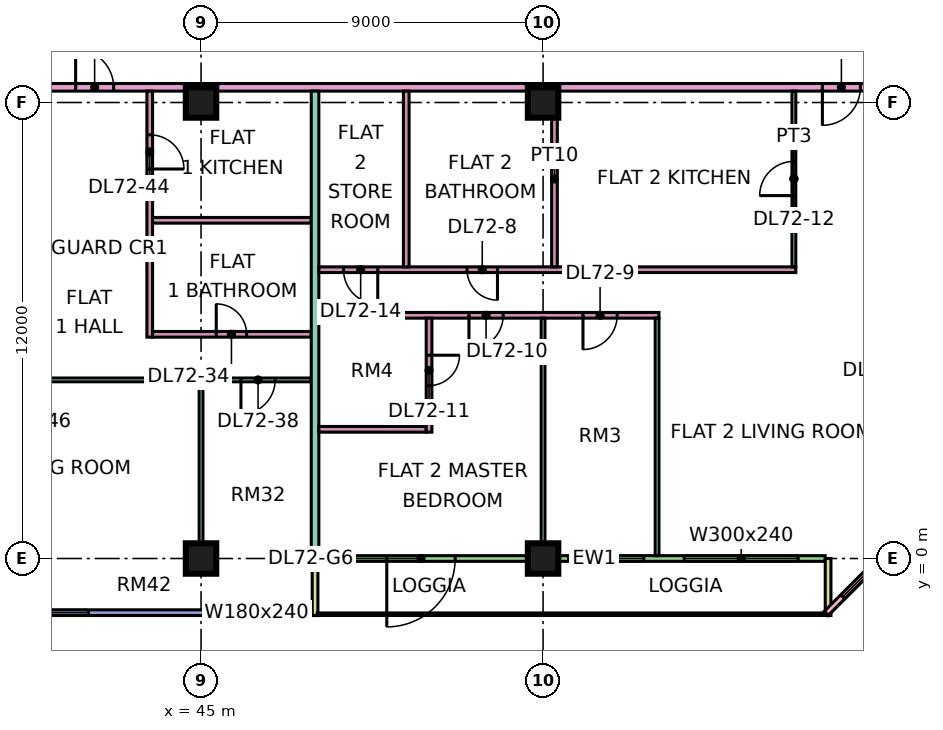
"""IFC4 building model, lengths in metres.
Left out: names, types, materials, properties, quantities, classifications, styles, units other than length and angle.
Written with IfcOpenShell. Run it as: python <this file> out.ifc"""

import sys

from ifc_helpers import new_model, si_unit, direction, frame, frame_2d, origin, origin_2d, place, context, subcontext, project, spatial, rectangle, extrude, element, fill, save


model = new_model("IFC4")
c1 = context("Model", 3, precision=1e-05, world=origin(), true_north=direction((0.0, 1.0)))
c2 = subcontext(c1, "Body", "Model", "MODEL_VIEW")
j1 = project(units=[si_unit("LENGTHUNIT", "METRE"), si_unit("PLANEANGLEUNIT", "RADIAN")], contexts=[c1])
p1 = place(None, origin())
s1 = spatial("IfcSite", under=j1, at=p1, CompositionType="ELEMENT")
p2 = place(p1, origin())
s2 = spatial("IfcBuilding", under=s1, at=p2, CompositionType="ELEMENT")
p3 = place(p2, frame((0.0, 0.0, 307.15)))
s3 = spatial("IfcBuildingStorey", under=s2, at=p3, CompositionType="ELEMENT", Elevation=307.15)
for number, where, z_axis, x_axis in (
    (1, (45.0, 0.0, 0.0), (0.0, 0.0, 1.0), (1.0, 0.0, 0.0)),
    (2, (45.0, 12.0, 0.0), (0.0, 0.0, 1.0), (1.0, 0.0, 0.0)),
    (3, (54.0, 0.0, 0.0), (0.0, 0.0, 1.0), (1.0, 0.0, 0.0)),
    (4, (54.0, 12.0, 0.0), (0.0, 0.0, 1.0), (1.0, 0.0, 0.0)),
):
    element("IfcColumn", number, at=place(p3, frame(where, z_axis=z_axis, x_axis=x_axis)), inside=s3, PredefinedType="COLUMN", context=c2, shape_type="SweptSolid", body=[
        extrude(rectangle(XDim=0.8, YDim=0.8, at=origin_2d()), origin(), (0.0, 0.0, 1.0), 3.75),
    ])
p4 = place(p3, frame((36.075, -1.425, 0.0), z_axis=(0.0, 0.0, 1.0), x_axis=(1.0, 0.0, 0.0)))
e5 = element("IfcWall", 5, at=p4, inside=s3, PredefinedType="SOLIDWALL", context=c2, shape_type="SweptSolid", body=[
    extrude(rectangle(XDim=11.85, YDim=0.15, at=frame_2d((5.925, 0.0))), origin(), (0.0, 0.0, 1.0), 3.35),
])
p5 = place(p4, frame((2.962, 0.0, 0.45)))
e6 = element("IfcOpeningElement", 6, at=p5, cuts=e5, PredefinedType="OPENING", context=c2, shape_type="SweptSolid", body=[
    extrude(rectangle(XDim=3.0, YDim=2.4, at=frame_2d((1.5, 1.2))), frame((0.0, 0.085, 0.0), z_axis=(0.0, -1.0, 0.0), x_axis=(1.0, 0.0, 0.0)), (0.0, 0.0, 1.0), 0.17),
])
p6 = place(p4, frame((9.488, 0.0, 0.45)))
e7 = element("IfcOpeningElement", 7, at=p6, cuts=e5, PredefinedType="OPENING", context=c2, shape_type="SweptSolid", body=[
    extrude(rectangle(XDim=1.8, YDim=2.4, at=frame_2d((0.9, 1.2))), frame((0.0, 0.085, 0.0), z_axis=(0.0, -1.0, 0.0), x_axis=(1.0, 0.0, 0.0)), (0.0, 0.0, 1.0), 0.17),
])
p7 = place(p3, frame((48.075, 0.0, 0.0), z_axis=(0.0, 0.0, 1.0), x_axis=(1.0, 0.0, 0.0)))
e8 = element("IfcWall", 8, at=p7, inside=s3, PredefinedType="SOLIDWALL", context=c2, shape_type="SweptSolid", body=[
    extrude(rectangle(XDim=13.35, YDim=0.15, at=frame_2d((6.675, 0.0))), origin(), (0.0, 0.0, 1.0), 3.35),
])
p8 = place(p7, frame((1.812, 0.0, 0.0)))
e9 = element("IfcOpeningElement", 9, at=p8, cuts=e8, PredefinedType="OPENING", context=c2, shape_type="SweptSolid", body=[
    extrude(rectangle(XDim=1.8, YDim=2.4, at=frame_2d((0.9, 1.2))), frame((0.0, 0.085, 0.0), z_axis=(0.0, -1.0, 0.0), x_axis=(1.0, 0.0, 0.0)), (0.0, 0.0, 1.0), 0.17),
])
p9 = place(p7, frame((6.775, 0.0, 0.45)))
e10 = element("IfcOpeningElement", 10, at=p9, cuts=e8, PredefinedType="OPENING", context=c2, shape_type="SweptSolid", body=[
    extrude(rectangle(XDim=1.8, YDim=2.4, at=frame_2d((0.9, 1.2))), frame((0.0, 0.085, 0.0), z_axis=(0.0, -1.0, 0.0), x_axis=(1.0, 0.0, 0.0)), (0.0, 0.0, 1.0), 0.17),
])
p10 = place(p7, frame((9.637, 0.0, 0.45)))
e11 = element("IfcOpeningElement", 11, at=p10, cuts=e8, PredefinedType="OPENING", context=c2, shape_type="SweptSolid", body=[
    extrude(rectangle(XDim=3.0, YDim=2.4, at=frame_2d((1.5, 1.2))), frame((0.0, 0.085, 0.0), z_axis=(0.0, -1.0, 0.0), x_axis=(1.0, 0.0, 0.0)), (0.0, 0.0, 1.0), 0.17),
])
for number, where, z_axis, x_axis in (
    (12, (48.0, -1.5, 0.0), (0.0, 0.0, 1.0), (0.0, 1.0, 0.0)),
    (13, (61.5, -1.5, 0.0), (0.0, 0.0, 1.0), (0.0, 1.0, 0.0)),
):
    element("IfcWall", number, at=place(p3, frame(where, z_axis=z_axis, x_axis=x_axis)), inside=s3, PredefinedType="SOLIDWALL", context=c2, shape_type="SweptSolid", body=[
        extrude(rectangle(XDim=1.5, YDim=0.15, at=frame_2d((0.75, 0.0))), origin(), (0.0, 0.0, 1.0), 3.35),
    ])
p11 = place(p3, frame((61.447, -1.447, 0.0), z_axis=(0.0, 0.0, 1.0), x_axis=(0.707106781187, 0.707106781187, 0.0)))
e14 = element("IfcWall", 14, at=p11, inside=s3, PredefinedType="SOLIDWALL", context=c2, shape_type="SweptSolid", body=[
    extrude(rectangle(XDim=4.243, YDim=0.15, at=frame_2d((2.121, 0.0))), origin(), (0.0, 0.0, 1.0), 3.35),
])
p12 = place(p11, frame((0.621, 0.0, 0.45)))
e15 = element("IfcOpeningElement", 15, at=p12, cuts=e14, PredefinedType="OPENING", context=c2, shape_type="SweptSolid", body=[
    extrude(rectangle(XDim=3.0, YDim=2.4, at=frame_2d((1.5, 1.2))), frame((0.0, 0.085, 0.0), z_axis=(0.0, -1.0, 0.0), x_axis=(1.0, 0.0, 0.0)), (0.0, 0.0, 1.0), 0.17),
])
p13 = place(p3, frame((33.05, 4.7, 0.0), z_axis=(0.0, 0.0, 1.0), x_axis=(1.0, 0.0, 0.0)))
e16 = element("IfcWall", 16, at=p13, inside=s3, PredefinedType="PARTITIONING", context=c2, shape_type="SweptSolid", body=[
    extrude(rectangle(XDim=14.85, YDim=0.1, at=frame_2d((7.425, 0.0))), origin(), (0.0, 0.0, 1.0), 3.35),
])
p14 = place(p13, frame((1.0, 0.0, 0.0)))
e17 = element("IfcOpeningElement", 17, at=p14, cuts=e16, PredefinedType="OPENING", context=c2, shape_type="SweptSolid", body=[
    extrude(rectangle(XDim=0.9, YDim=2.1, at=frame_2d((0.45, 1.05))), frame((0.0, 0.06, 0.0), z_axis=(0.0, -1.0, 0.0), x_axis=(1.0, 0.0, 0.0)), (0.0, 0.0, 1.0), 0.12),
])
p15 = place(p13, frame((13.0, 0.0, 0.0)))
e18 = element("IfcOpeningElement", 18, at=p15, cuts=e16, PredefinedType="OPENING", context=c2, shape_type="SweptSolid", body=[
    extrude(rectangle(XDim=0.9, YDim=2.1, at=frame_2d((0.45, 1.05))), frame((0.0, 0.06, 0.0), z_axis=(0.0, -1.0, 0.0), x_axis=(1.0, 0.0, 0.0)), (0.0, 0.0, 1.0), 0.12),
])
p16 = place(p13, frame((7.0, 0.0, 0.0)))
e19 = element("IfcOpeningElement", 19, at=p16, cuts=e16, PredefinedType="OPENING", context=c2, shape_type="SweptSolid", body=[
    extrude(rectangle(XDim=0.9, YDim=2.1, at=frame_2d((0.45, 1.05))), frame((0.0, 0.06, 0.0), z_axis=(0.0, -1.0, 0.0), x_axis=(1.0, 0.0, 0.0)), (0.0, 0.0, 1.0), 0.12),
])
p17 = place(p3, frame((40.65, 12.4, 0.0), z_axis=(0.0, 0.0, 1.0), x_axis=(1.0, 0.0, 0.0)))
e20 = element("IfcWall", 20, at=p17, inside=s3, PredefinedType="PARTITIONING", context=c2, shape_type="SweptSolid", body=[
    extrude(rectangle(XDim=22.35, YDim=0.2, at=frame_2d((11.175, 0.0))), origin(), (0.0, 0.0, 1.0), 3.35),
])
p18 = place(p17, frame((20.7, 0.0, 0.0)))
e21 = element("IfcOpeningElement", 21, at=p18, cuts=e20, PredefinedType="OPENING", context=c2, shape_type="SweptSolid", body=[
    extrude(rectangle(XDim=1.0, YDim=2.1, at=frame_2d((0.5, 1.05))), frame((0.0, 0.11, 0.0), z_axis=(0.0, -1.0, 0.0), x_axis=(1.0, 0.0, 0.0)), (0.0, 0.0, 1.0), 0.22),
])
p19 = place(p17, frame((1.05, 0.0, 0.0)))
e22 = element("IfcOpeningElement", 22, at=p19, cuts=e20, PredefinedType="OPENING", context=c2, shape_type="SweptSolid", body=[
    extrude(rectangle(XDim=1.0, YDim=2.1, at=frame_2d((0.5, 1.05))), frame((0.0, 0.11, 0.0), z_axis=(0.0, -1.0, 0.0), x_axis=(1.0, 0.0, 0.0)), (0.0, 0.0, 1.0), 0.22),
])
p20 = place(p3, frame((43.65, 5.825, 0.0), z_axis=(0.0, 0.0, 1.0), x_axis=(0.0, 1.0, 0.0)))
e23 = element("IfcWall", 23, at=p20, inside=s3, PredefinedType="PARTITIONING", context=c2, shape_type="SweptSolid", body=[
    extrude(rectangle(XDim=6.475, YDim=0.15, at=frame_2d((3.238, 0.0))), origin(), (0.0, 0.0, 1.0), 3.35),
])
p21 = place(p20, frame((4.425, 0.0, 0.0)))
e24 = element("IfcOpeningElement", 24, at=p21, cuts=e23, PredefinedType="OPENING", context=c2, shape_type="SweptSolid", body=[
    extrude(rectangle(XDim=0.9, YDim=2.1, at=frame_2d((0.45, 1.05))), frame((0.0, 0.085, 0.0), z_axis=(0.0, -1.0, 0.0), x_axis=(1.0, 0.0, 0.0)), (0.0, 0.0, 1.0), 0.17),
])
p22 = place(p3, frame((43.725, 5.9, 0.0), z_axis=(0.0, 0.0, 1.0), x_axis=(1.0, 0.0, 0.0)))
e25 = element("IfcWall", 25, at=p22, inside=s3, PredefinedType="PARTITIONING", context=c2, shape_type="SweptSolid", body=[
    extrude(rectangle(XDim=4.175, YDim=0.15, at=frame_2d((2.087, 0.0))), origin(), (0.0, 0.0, 1.0), 3.35),
])
p23 = place(p22, frame((1.675, 0.0, 0.0)))
e26 = element("IfcOpeningElement", 26, at=p23, cuts=e25, PredefinedType="OPENING", context=c2, shape_type="SweptSolid", body=[
    extrude(rectangle(XDim=0.8, YDim=2.1, at=frame_2d((0.4, 1.05))), frame((0.0, 0.085, 0.0), z_axis=(0.0, -1.0, 0.0), x_axis=(1.0, 0.0, 0.0)), (0.0, 0.0, 1.0), 0.17),
])
p24 = place(p3, frame((43.725, 8.9, 0.0), z_axis=(0.0, 0.0, 1.0), x_axis=(1.0, 0.0, 0.0)))
e27 = element("IfcWall", 27, at=p24, inside=s3, PredefinedType="PARTITIONING", context=c2, shape_type="SweptSolid", body=[
    extrude(rectangle(XDim=4.175, YDim=0.15, at=frame_2d((2.087, 0.0))), origin(), (0.0, 0.0, 1.0), 3.35),
])
p25 = place(p3, frame((45.0, 0.0, 0.0), z_axis=(0.0, 0.0, 1.0), x_axis=(0.0, 1.0, 0.0)))
e28 = element("IfcWall", 28, at=p25, inside=s3, PredefinedType="PARTITIONING", context=c2, shape_type="SweptSolid", body=[
    extrude(rectangle(XDim=4.65, YDim=0.1, at=frame_2d((2.325, 0.0))), origin(), (0.0, 0.0, 1.0), 3.35),
])
p26 = place(p3, frame((48.0, 0.0, 0.0), z_axis=(0.0, 0.0, 1.0), x_axis=(0.0, 1.0, 0.0)))
e29 = element("IfcWall", 29, at=p26, inside=s3, PredefinedType="PARTITIONING", context=c2, shape_type="SweptSolid", body=[
    extrude(rectangle(XDim=12.3, YDim=0.2, at=frame_2d((6.15, 0.0))), origin(), (0.0, 0.0, 1.0), 3.35),
])
p27 = place(p3, frame((48.1, 3.4, 0.0), z_axis=(0.0, 0.0, 1.0), x_axis=(1.0, 0.0, 0.0)))
e30 = element("IfcWall", 30, at=p27, inside=s3, PredefinedType="PARTITIONING", context=c2, shape_type="SweptSolid", body=[
    extrude(rectangle(XDim=2.825, YDim=0.15, at=frame_2d((1.413, 0.0))), origin(), (0.0, 0.0, 1.0), 3.35),
])
p28 = place(p3, frame((48.1, 6.4, 0.0), z_axis=(0.0, 0.0, 1.0), x_axis=(1.0, 0.0, 0.0)))
e31 = element("IfcWall", 31, at=p28, inside=s3, PredefinedType="PARTITIONING", context=c2, shape_type="SweptSolid", body=[
    extrude(rectangle(XDim=8.95, YDim=0.15, at=frame_2d((4.475, 0.0))), origin(), (0.0, 0.0, 1.0), 3.35),
])
p29 = place(p28, frame((6.95, 0.0, 0.0)))
e32 = element("IfcOpeningElement", 32, at=p29, cuts=e31, PredefinedType="OPENING", context=c2, shape_type="SweptSolid", body=[
    extrude(rectangle(XDim=0.9, YDim=2.1, at=frame_2d((0.45, 1.05))), frame((0.0, 0.085, 0.0), z_axis=(0.0, -1.0, 0.0), x_axis=(1.0, 0.0, 0.0)), (0.0, 0.0, 1.0), 0.17),
])
p30 = place(p28, frame((3.95, 0.0, 0.0)))
e33 = element("IfcOpeningElement", 33, at=p30, cuts=e31, PredefinedType="OPENING", context=c2, shape_type="SweptSolid", body=[
    extrude(rectangle(XDim=0.9, YDim=2.1, at=frame_2d((0.45, 1.05))), frame((0.0, 0.085, 0.0), z_axis=(0.0, -1.0, 0.0), x_axis=(1.0, 0.0, 0.0)), (0.0, 0.0, 1.0), 0.17),
])
p31 = place(p3, frame((48.1, 7.6, 0.0), z_axis=(0.0, 0.0, 1.0), x_axis=(1.0, 0.0, 0.0)))
e34 = element("IfcWall", 34, at=p31, inside=s3, PredefinedType="PARTITIONING", context=c2, shape_type="SweptSolid", body=[
    extrude(rectangle(XDim=12.55, YDim=0.15, at=frame_2d((6.275, 0.0))), origin(), (0.0, 0.0, 1.0), 3.35),
])
p32 = place(p31, frame((3.9, 0.0, 0.0)))
e35 = element("IfcOpeningElement", 35, at=p32, cuts=e34, PredefinedType="OPENING", context=c2, shape_type="SweptSolid", body=[
    extrude(rectangle(XDim=0.8, YDim=2.1, at=frame_2d((0.4, 1.05))), frame((0.0, 0.085, 0.0), z_axis=(0.0, -1.0, 0.0), x_axis=(1.0, 0.0, 0.0)), (0.0, 0.0, 1.0), 0.17),
])
p33 = place(p31, frame((0.65, 0.0, 0.0)))
e36 = element("IfcOpeningElement", 36, at=p33, cuts=e34, PredefinedType="OPENING", context=c2, shape_type="SweptSolid", body=[
    extrude(rectangle(XDim=0.9, YDim=2.1, at=frame_2d((0.45, 1.05))), frame((0.0, 0.085, 0.0), z_axis=(0.0, -1.0, 0.0), x_axis=(1.0, 0.0, 0.0)), (0.0, 0.0, 1.0), 0.17),
])
p34 = place(p3, frame((50.4, 7.675, 0.0), z_axis=(0.0, 0.0, 1.0), x_axis=(0.0, 1.0, 0.0)))
e37 = element("IfcWall", 37, at=p34, inside=s3, PredefinedType="PARTITIONING", context=c2, shape_type="SweptSolid", body=[
    extrude(rectangle(XDim=4.625, YDim=0.15, at=frame_2d((2.312, 0.0))), origin(), (0.0, 0.0, 1.0), 3.35),
])
p35 = place(p3, frame((51.0, 3.325, 0.0), z_axis=(0.0, 0.0, 1.0), x_axis=(0.0, 1.0, 0.0)))
e38 = element("IfcWall", 38, at=p35, inside=s3, PredefinedType="PARTITIONING", context=c2, shape_type="SweptSolid", body=[
    extrude(rectangle(XDim=3.0, YDim=0.15, at=frame_2d((1.5, 0.0))), origin(), (0.0, 0.0, 1.0), 3.35),
])
p36 = place(p35, frame((1.225, 0.0, 0.0)))
e39 = element("IfcOpeningElement", 39, at=p36, cuts=e38, PredefinedType="OPENING", context=c2, shape_type="SweptSolid", body=[
    extrude(rectangle(XDim=0.8, YDim=2.1, at=frame_2d((0.4, 1.05))), frame((0.0, 0.085, 0.0), z_axis=(0.0, -1.0, 0.0), x_axis=(1.0, 0.0, 0.0)), (0.0, 0.0, 1.0), 0.17),
])
p37 = place(p3, frame((54.0, 0.074, 0.0), z_axis=(0.0, 0.0, 1.0), x_axis=(0.0, 1.0, 0.0)))
e40 = element("IfcWall", 40, at=p37, inside=s3, PredefinedType="PARTITIONING", context=c2, shape_type="SweptSolid", body=[
    extrude(rectangle(XDim=6.251, YDim=0.1, at=frame_2d((3.125, 0.0))), origin(), (0.0, 0.0, 1.0), 3.35),
])
p38 = place(p3, frame((54.3, 7.675, 0.0), z_axis=(0.0, 0.0, 1.0), x_axis=(0.0, 1.0, 0.0)))
e41 = element("IfcWall", 41, at=p38, inside=s3, PredefinedType="PARTITIONING", context=c2, shape_type="SweptSolid", body=[
    extrude(rectangle(XDim=4.625, YDim=0.15, at=frame_2d((2.312, 0.0))), origin(), (0.0, 0.0, 1.0), 3.35),
])
p39 = place(p3, frame((57.0, 0.074, 0.0), z_axis=(0.0, 0.0, 1.0), x_axis=(0.0, 1.0, 0.0)))
e42 = element("IfcWall", 42, at=p39, inside=s3, PredefinedType="PARTITIONING", context=c2, shape_type="SweptSolid", body=[
    extrude(rectangle(XDim=6.251, YDim=0.1, at=frame_2d((3.125, 0.0))), origin(), (0.0, 0.0, 1.0), 3.35),
])
p40 = place(p3, frame((60.6, 7.675, 0.0), z_axis=(0.0, 0.0, 1.0), x_axis=(0.0, 1.0, 0.0)))
e43 = element("IfcWall", 43, at=p40, inside=s3, PredefinedType="PARTITIONING", context=c2, shape_type="SweptSolid", body=[
    extrude(rectangle(XDim=4.625, YDim=0.1, at=frame_2d((2.312, 0.0))), origin(), (0.0, 0.0, 1.0), 3.35),
])
p41 = place(p40, frame((1.875, 0.0, 0.0)))
e44 = element("IfcOpeningElement", 44, at=p41, cuts=e43, PredefinedType="OPENING", context=c2, shape_type="SweptSolid", body=[
    extrude(rectangle(XDim=0.9, YDim=2.1, at=frame_2d((0.45, 1.05))), frame((0.0, 0.06, 0.0), z_axis=(0.0, -1.0, 0.0), x_axis=(1.0, 0.0, 0.0)), (0.0, 0.0, 1.0), 0.12),
])
p42 = place(p5, origin())
e45 = element("IfcWindow", 45, at=p42, inside=s3, PartitioningType="SINGLE_PANEL", PredefinedType="WINDOW", context=c2, shape_type="SweptSolid", body=[
    extrude(rectangle(XDim=3.0, YDim=2.4, at=frame_2d((1.5, 1.2))), frame((0.0, 0.03, 0.0), z_axis=(0.0, -1.0, 0.0), x_axis=(1.0, 0.0, 0.0)), (0.0, 0.0, 1.0), 0.06),
])
fill(e6, e45)
p43 = place(p6, origin())
e46 = element("IfcWindow", 46, at=p43, inside=s3, PartitioningType="SINGLE_PANEL", PredefinedType="WINDOW", context=c2, shape_type="SweptSolid", body=[
    extrude(rectangle(XDim=1.8, YDim=2.4, at=frame_2d((0.9, 1.2))), frame((0.0, 0.03, 0.0), z_axis=(0.0, -1.0, 0.0), x_axis=(1.0, 0.0, 0.0)), (0.0, 0.0, 1.0), 0.06),
])
fill(e7, e46)
p44 = place(p8, frame((1.8, 0.0, 0.0), z_axis=(0.0, 0.0, 1.0), x_axis=(-1.0, 0.0, 0.0)))
e47 = element("IfcDoor", 47, at=p44, inside=s3, OperationType="DOUBLE_DOOR_SINGLE_SWING", PredefinedType="DOOR", context=c2, shape_type="SweptSolid", body=[
    extrude(rectangle(XDim=1.8, YDim=2.4, at=frame_2d((0.9, 1.2))), frame((0.0, 0.025, 0.0), z_axis=(0.0, -1.0, 0.0), x_axis=(1.0, 0.0, 0.0)), (0.0, 0.0, 1.0), 0.05),
])
fill(e9, e47)
p45 = place(p9, origin())
e48 = element("IfcWindow", 48, at=p45, inside=s3, PartitioningType="SINGLE_PANEL", PredefinedType="WINDOW", context=c2, shape_type="SweptSolid", body=[
    extrude(rectangle(XDim=1.8, YDim=2.4, at=frame_2d((0.9, 1.2))), frame((0.0, 0.03, 0.0), z_axis=(0.0, -1.0, 0.0), x_axis=(1.0, 0.0, 0.0)), (0.0, 0.0, 1.0), 0.06),
])
fill(e10, e48)
p46 = place(p10, origin())
e49 = element("IfcWindow", 49, at=p46, inside=s3, PartitioningType="SINGLE_PANEL", PredefinedType="WINDOW", context=c2, shape_type="SweptSolid", body=[
    extrude(rectangle(XDim=3.0, YDim=2.4, at=frame_2d((1.5, 1.2))), frame((0.0, 0.03, 0.0), z_axis=(0.0, -1.0, 0.0), x_axis=(1.0, 0.0, 0.0)), (0.0, 0.0, 1.0), 0.06),
])
fill(e11, e49)
p47 = place(p12, origin())
e50 = element("IfcWindow", 50, at=p47, inside=s3, PartitioningType="SINGLE_PANEL", PredefinedType="WINDOW", context=c2, shape_type="SweptSolid", body=[
    extrude(rectangle(XDim=3.0, YDim=2.4, at=frame_2d((1.5, 1.2))), frame((0.0, 0.03, 0.0), z_axis=(0.0, -1.0, 0.0), x_axis=(1.0, 0.0, 0.0)), (0.0, 0.0, 1.0), 0.06),
])
fill(e15, e50)
p48 = place(p32, origin())
e51 = element("IfcDoor", 51, at=p48, inside=s3, OperationType="SINGLE_SWING_RIGHT", PredefinedType="DOOR", context=c2, shape_type="SweptSolid", body=[
    extrude(rectangle(XDim=0.8, YDim=2.1, at=frame_2d((0.4, 1.05))), frame((0.0, 0.025, 0.0), z_axis=(0.0, -1.0, 0.0), x_axis=(1.0, 0.0, 0.0)), (0.0, 0.0, 1.0), 0.05),
])
fill(e35, e51)
p49 = place(p29, frame((0.9, 0.0, 0.0), z_axis=(0.0, 0.0, 1.0), x_axis=(-1.0, 0.0, 0.0)))
e52 = element("IfcDoor", 52, at=p49, inside=s3, OperationType="SINGLE_SWING_LEFT", PredefinedType="DOOR", context=c2, shape_type="SweptSolid", body=[
    extrude(rectangle(XDim=0.9, YDim=2.1, at=frame_2d((0.45, 1.05))), frame((0.0, 0.025, 0.0), z_axis=(0.0, -1.0, 0.0), x_axis=(1.0, 0.0, 0.0)), (0.0, 0.0, 1.0), 0.05),
])
fill(e32, e52)
p50 = place(p30, frame((0.9, 0.0, 0.0), z_axis=(0.0, 0.0, 1.0), x_axis=(-1.0, 0.0, 0.0)))
e53 = element("IfcDoor", 53, at=p50, inside=s3, OperationType="SINGLE_SWING_LEFT", PredefinedType="DOOR", context=c2, shape_type="SweptSolid", body=[
    extrude(rectangle(XDim=0.9, YDim=2.1, at=frame_2d((0.45, 1.05))), frame((0.0, 0.025, 0.0), z_axis=(0.0, -1.0, 0.0), x_axis=(1.0, 0.0, 0.0)), (0.0, 0.0, 1.0), 0.05),
])
fill(e33, e53)
p51 = place(p36, origin())
e54 = element("IfcDoor", 54, at=p51, inside=s3, OperationType="SINGLE_SWING_RIGHT", PredefinedType="DOOR", context=c2, shape_type="SweptSolid", body=[
    extrude(rectangle(XDim=0.8, YDim=2.1, at=frame_2d((0.4, 1.05))), frame((0.0, 0.025, 0.0), z_axis=(0.0, -1.0, 0.0), x_axis=(1.0, 0.0, 0.0)), (0.0, 0.0, 1.0), 0.05),
])
fill(e39, e54)
p52 = place(p41, origin())
e55 = element("IfcDoor", 55, at=p52, inside=s3, OperationType="SINGLE_SWING_LEFT", PredefinedType="DOOR", context=c2, shape_type="SweptSolid", body=[
    extrude(rectangle(XDim=0.9, YDim=2.1, at=frame_2d((0.45, 1.05))), frame((0.0, 0.025, 0.0), z_axis=(0.0, -1.0, 0.0), x_axis=(1.0, 0.0, 0.0)), (0.0, 0.0, 1.0), 0.05),
])
fill(e44, e55)
p53 = place(p18, frame((1.0, 0.0, 0.0), z_axis=(0.0, 0.0, 1.0), x_axis=(-1.0, 0.0, 0.0)))
e56 = element("IfcDoor", 56, at=p53, inside=s3, OperationType="SINGLE_SWING_LEFT", PredefinedType="DOOR", context=c2, shape_type="SweptSolid", body=[
    extrude(rectangle(XDim=1.0, YDim=2.1, at=frame_2d((0.5, 1.05))), frame((0.0, 0.025, 0.0), z_axis=(0.0, -1.0, 0.0), x_axis=(1.0, 0.0, 0.0)), (0.0, 0.0, 1.0), 0.05),
])
fill(e21, e56)
p54 = place(p33, origin())
e57 = element("IfcDoor", 57, at=p54, inside=s3, OperationType="SINGLE_SWING_RIGHT", PredefinedType="DOOR", context=c2, shape_type="SweptSolid", body=[
    extrude(rectangle(XDim=0.9, YDim=2.1, at=frame_2d((0.45, 1.05))), frame((0.0, 0.025, 0.0), z_axis=(0.0, -1.0, 0.0), x_axis=(1.0, 0.0, 0.0)), (0.0, 0.0, 1.0), 0.05),
])
fill(e36, e57)
p55 = place(p23, origin())
e58 = element("IfcDoor", 58, at=p55, inside=s3, OperationType="SINGLE_SWING_LEFT", PredefinedType="DOOR", context=c2, shape_type="SweptSolid", body=[
    extrude(rectangle(XDim=0.8, YDim=2.1, at=frame_2d((0.4, 1.05))), frame((0.0, 0.025, 0.0), z_axis=(0.0, -1.0, 0.0), x_axis=(1.0, 0.0, 0.0)), (0.0, 0.0, 1.0), 0.05),
])
fill(e26, e58)
p56 = place(p15, frame((0.9, 0.0, 0.0), z_axis=(0.0, 0.0, 1.0), x_axis=(-1.0, 0.0, 0.0)))
e59 = element("IfcDoor", 59, at=p56, inside=s3, OperationType="SINGLE_SWING_LEFT", PredefinedType="DOOR", context=c2, shape_type="SweptSolid", body=[
    extrude(rectangle(XDim=0.9, YDim=2.1, at=frame_2d((0.45, 1.05))), frame((0.0, 0.025, 0.0), z_axis=(0.0, -1.0, 0.0), x_axis=(1.0, 0.0, 0.0)), (0.0, 0.0, 1.0), 0.05),
])
fill(e18, e59)
p57 = place(p19, origin())
e60 = element("IfcDoor", 60, at=p57, inside=s3, OperationType="SINGLE_SWING_LEFT", PredefinedType="DOOR", context=c2, shape_type="SweptSolid", body=[
    extrude(rectangle(XDim=1.0, YDim=2.1, at=frame_2d((0.5, 1.05))), frame((0.0, 0.025, 0.0), z_axis=(0.0, -1.0, 0.0), x_axis=(1.0, 0.0, 0.0)), (0.0, 0.0, 1.0), 0.05),
])
fill(e22, e60)
p58 = place(p21, frame((0.9, 0.0, 0.0), z_axis=(0.0, 0.0, 1.0), x_axis=(-1.0, 0.0, 0.0)))
e61 = element("IfcDoor", 61, at=p58, inside=s3, OperationType="SINGLE_SWING_LEFT", PredefinedType="DOOR", context=c2, shape_type="SweptSolid", body=[
    extrude(rectangle(XDim=0.9, YDim=2.1, at=frame_2d((0.45, 1.05))), frame((0.0, 0.025, 0.0), z_axis=(0.0, -1.0, 0.0), x_axis=(1.0, 0.0, 0.0)), (0.0, 0.0, 1.0), 0.05),
])
fill(e24, e61)
save(model, sys.argv[1])
